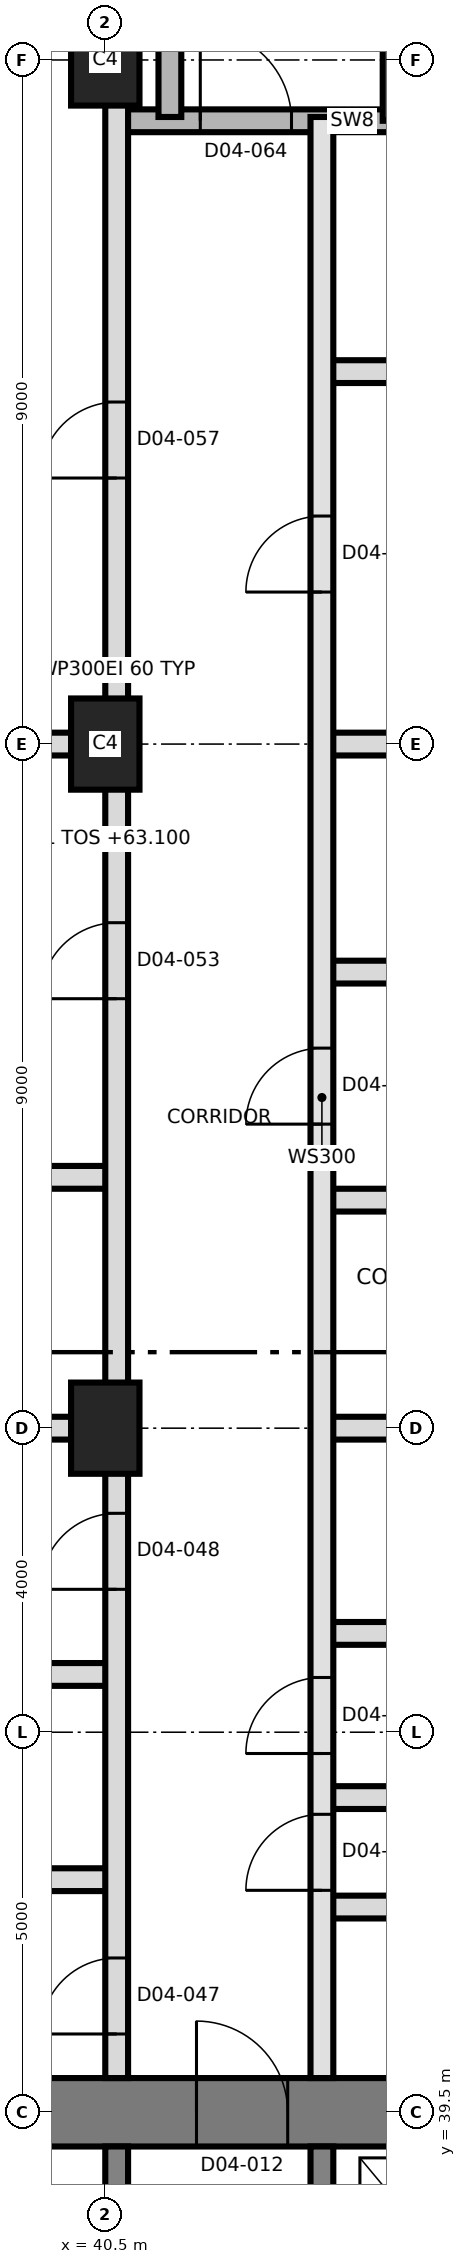
"""IFC4 building model, lengths in metres.
Left out: names, types, materials, properties, quantities, classifications, styles, units other than length and angle.
Written with IfcOpenShell. Run it as: python <this file> out.ifc"""

import sys

from ifc_helpers import new_model, si_unit, direction, frame, frame_2d, origin, origin_2d, place, context, subcontext, project, spatial, rectangle, extrude, element, fill, save


model = new_model("IFC4")
c1 = context("Model", 3, precision=1e-05, world=origin(), true_north=direction((0.0, 1.0)))
c2 = subcontext(c1, "Body", "Model", "MODEL_VIEW")
j1 = project(units=[si_unit("LENGTHUNIT", "METRE"), si_unit("PLANEANGLEUNIT", "RADIAN")], contexts=[c1])
p1 = place(None, origin())
s1 = spatial("IfcSite", under=j1, at=p1, CompositionType="ELEMENT")
p2 = place(p1, origin())
s2 = spatial("IfcBuilding", under=s1, at=p2, CompositionType="ELEMENT")
p3 = place(p2, frame((0.0, 0.0, 63.1)))
s3 = spatial("IfcBuildingStorey", under=s2, at=p3, CompositionType="ELEMENT", Elevation=63.1)
p4 = place(p3, frame((31.05, 39.5, 0.0), z_axis=(0.0, 0.0, 1.0), x_axis=(1.0, 0.0, 0.0)))
e1 = element("IfcWall", 1, at=p4, inside=s3, PredefinedType="SHEAR", context=c2, shape_type="SweptSolid", body=[
    extrude(rectangle(XDim=27.0, YDim=0.9, at=frame_2d((13.5, 0.0))), origin(), (0.0, 0.0, 1.0), 3.7),
])
p5 = place(p4, frame((10.65, 0.0, 0.0)))
e2 = element("IfcOpeningElement", 2, at=p5, cuts=e1, PredefinedType="OPENING", context=c2, shape_type="SweptSolid", body=[
    extrude(rectangle(XDim=1.2, YDim=2.1, at=frame_2d((0.6, 1.05))), frame((0.0, 0.46, 0.0), z_axis=(0.0, -1.0, 0.0), x_axis=(1.0, 0.0, 0.0)), (0.0, 0.0, 1.0), 0.92),
])
for number, where, z_axis, x_axis in (
    (3, (40.65, 33.5, 0.0), (0.0, 0.0, 1.0), (0.0, 1.0, 0.0)),
    (4, (43.35, 33.5, 0.0), (0.0, 0.0, 1.0), (0.0, 1.0, 0.0)),
):
    element("IfcWall", number, at=place(p3, frame(where, z_axis=z_axis, x_axis=x_axis)), inside=s3, PredefinedType="SHEAR", context=c2, shape_type="SweptSolid", body=[
        extrude(rectangle(XDim=5.55, YDim=0.3, at=frame_2d((2.775, 0.0))), origin(), (0.0, 0.0, 1.0), 3.7),
    ])
for number, where, z_axis, x_axis in (
    (5, (40.5, 48.5, 0.0), (0.0, 0.0, 1.0), (0.0, 1.0, 0.0)),
    (6, (40.5, 57.5, 0.0), (0.0, 0.0, 1.0), (0.0, 1.0, 0.0)),
    (7, (40.5, 66.5, 0.0), (0.0, 0.0, 1.0), (0.0, 1.0, 0.0)),
):
    element("IfcColumn", number, at=place(p3, frame(where, z_axis=z_axis, x_axis=x_axis)), inside=s3, PredefinedType="COLUMN", context=c2, shape_type="SweptSolid", body=[
        extrude(rectangle(XDim=1.2, YDim=0.9, at=origin_2d()), origin(), (0.0, 0.0, 1.0), 3.7),
    ])
for number, where, z_axis, x_axis in (
    (8, (43.35, 42.2, 0.0), (0.0, 0.0, 1.0), (1.0, 0.0, 0.0)),
    (9, (37.45, 42.56, 0.0), (0.0, 0.0, 1.0), (1.0, 0.0, 0.0)),
):
    element("IfcWall", number, at=place(p3, frame(where, z_axis=z_axis, x_axis=x_axis)), inside=s3, PredefinedType="PARTITIONING", context=c2, shape_type="SweptSolid", body=[
        extrude(rectangle(XDim=3.2, YDim=0.3, at=frame_2d((1.6, 0.0))), origin(), (0.0, 0.0, 1.0), 3.4),
    ])
p6 = place(p3, frame((43.35, 43.64, 0.0), z_axis=(0.0, 0.0, 1.0), x_axis=(1.0, 0.0, 0.0)))
e10 = element("IfcWall", 10, at=p6, inside=s3, PredefinedType="PARTITIONING", context=c2, shape_type="SweptSolid", body=[
    extrude(rectangle(XDim=9.323, YDim=0.3, at=frame_2d((4.662, 0.0))), origin(), (0.0, 0.0, 1.0), 3.4),
])
p7 = place(p3, frame((29.17, 45.26, 0.0), z_axis=(0.0, 0.0, 1.0), x_axis=(1.0, 0.0, 0.0)))
e11 = element("IfcWall", 11, at=p7, inside=s3, PredefinedType="PARTITIONING", context=c2, shape_type="SweptSolid", body=[
    extrude(rectangle(XDim=11.48, YDim=0.3, at=frame_2d((5.74, 0.0))), origin(), (0.0, 0.0, 1.0), 3.4),
])
p8 = place(p3, frame((43.35, 45.8, 0.0), z_axis=(0.0, 0.0, 1.0), x_axis=(1.0, 0.0, 0.0)))
e12 = element("IfcWall", 12, at=p8, inside=s3, PredefinedType="PARTITIONING", context=c2, shape_type="SweptSolid", body=[
    extrude(rectangle(XDim=3.2, YDim=0.3, at=frame_2d((1.6, 0.0))), origin(), (0.0, 0.0, 1.0), 3.4),
])
p9 = place(p3, frame((29.17, 48.5, 0.0), z_axis=(0.0, 0.0, 1.0), x_axis=(1.0, 0.0, 0.0)))
e13 = element("IfcWall", 13, at=p9, inside=s3, PredefinedType="PARTITIONING", context=c2, shape_type="SweptSolid", body=[
    extrude(rectangle(XDim=11.48, YDim=0.3, at=frame_2d((5.74, 0.0))), origin(), (0.0, 0.0, 1.0), 3.4),
])
p10 = place(p3, frame((43.35, 48.5, 0.0), z_axis=(0.0, 0.0, 1.0), x_axis=(1.0, 0.0, 0.0)))
e14 = element("IfcWall", 14, at=p10, inside=s3, PredefinedType="PARTITIONING", context=c2, shape_type="SweptSolid", body=[
    extrude(rectangle(XDim=8.66, YDim=0.3, at=frame_2d((4.33, 0.0))), origin(), (0.0, 0.0, 1.0), 3.4),
])
p11 = place(p3, frame((43.35, 51.5, 0.0), z_axis=(0.0, 0.0, 1.0), x_axis=(1.0, 0.0, 0.0)))
e15 = element("IfcWall", 15, at=p11, inside=s3, PredefinedType="PARTITIONING", context=c2, shape_type="SweptSolid", body=[
    extrude(rectangle(XDim=3.3, YDim=0.3, at=frame_2d((1.65, 0.0))), origin(), (0.0, 0.0, 1.0), 3.4),
])
p12 = place(p3, frame((37.15, 51.8, 0.0), z_axis=(0.0, 0.0, 1.0), x_axis=(1.0, 0.0, 0.0)))
e16 = element("IfcWall", 16, at=p12, inside=s3, PredefinedType="PARTITIONING", context=c2, shape_type="SweptSolid", body=[
    extrude(rectangle(XDim=3.5, YDim=0.3, at=frame_2d((1.75, 0.0))), origin(), (0.0, 0.0, 1.0), 3.4),
])
p13 = place(p3, frame((43.35, 54.5, 0.0), z_axis=(0.0, 0.0, 1.0), x_axis=(1.0, 0.0, 0.0)))
e17 = element("IfcWall", 17, at=p13, inside=s3, PredefinedType="PARTITIONING", context=c2, shape_type="SweptSolid", body=[
    extrude(rectangle(XDim=3.3, YDim=0.3, at=frame_2d((1.65, 0.0))), origin(), (0.0, 0.0, 1.0), 3.4),
])
p14 = place(p3, frame((29.17, 57.5, 0.0), z_axis=(0.0, 0.0, 1.0), x_axis=(1.0, 0.0, 0.0)))
e18 = element("IfcWall", 18, at=p14, inside=s3, PredefinedType="PARTITIONING", context=c2, shape_type="SweptSolid", body=[
    extrude(rectangle(XDim=11.48, YDim=0.3, at=frame_2d((5.74, 0.0))), origin(), (0.0, 0.0, 1.0), 3.4),
])
p15 = place(p3, frame((43.35, 57.5, 0.0), z_axis=(0.0, 0.0, 1.0), x_axis=(1.0, 0.0, 0.0)))
e19 = element("IfcWall", 19, at=p15, inside=s3, PredefinedType="PARTITIONING", context=c2, shape_type="SweptSolid", body=[
    extrude(rectangle(XDim=8.66, YDim=0.3, at=frame_2d((4.33, 0.0))), origin(), (0.0, 0.0, 1.0), 3.4),
])
p16 = place(p3, frame((43.35, 62.4, 0.0), z_axis=(0.0, 0.0, 1.0), x_axis=(1.0, 0.0, 0.0)))
e20 = element("IfcWall", 20, at=p16, inside=s3, PredefinedType="PARTITIONING", context=c2, shape_type="SweptSolid", body=[
    extrude(rectangle(XDim=8.66, YDim=0.3, at=frame_2d((4.33, 0.0))), origin(), (0.0, 0.0, 1.0), 3.4),
])
p17 = place(p16, frame((4.65, 0.0, 0.0)))
e21 = element("IfcOpeningElement", 21, at=p17, cuts=e20, PredefinedType="OPENING", context=c2, shape_type="SweptSolid", body=[
    extrude(rectangle(XDim=1.0, YDim=2.1, at=frame_2d((0.5, 1.05))), frame((0.0, 0.16, 0.0), z_axis=(0.0, -1.0, 0.0), x_axis=(1.0, 0.0, 0.0)), (0.0, 0.0, 1.0), 0.32),
])
p18 = place(p3, frame((40.65, 65.7, 0.0), z_axis=(0.0, 0.0, 1.0), x_axis=(1.0, 0.0, 0.0)))
e22 = element("IfcWall", 22, at=p18, inside=s3, PredefinedType="SHEAR", context=c2, shape_type="SweptSolid", body=[
    extrude(rectangle(XDim=6.2, YDim=0.3, at=frame_2d((3.1, 0.0))), origin(), (0.0, 0.0, 1.0), 3.4),
])
p19 = place(p18, frame((1.1, 0.0, 0.0)))
e23 = element("IfcOpeningElement", 23, at=p19, cuts=e22, PredefinedType="OPENING", context=c2, shape_type="SweptSolid", body=[
    extrude(rectangle(XDim=1.2, YDim=2.1, at=frame_2d((0.6, 1.05))), frame((0.0, 0.16, 0.0), z_axis=(0.0, -1.0, 0.0), x_axis=(1.0, 0.0, 0.0)), (0.0, 0.0, 1.0), 0.32),
])
p20 = place(p3, frame((40.65, 39.95, 0.0), z_axis=(0.0, 0.0, 1.0), x_axis=(0.0, 1.0, 0.0)))
e24 = element("IfcWall", 24, at=p20, inside=s3, PredefinedType="PARTITIONING", context=c2, shape_type="SweptSolid", body=[
    extrude(rectangle(XDim=37.05, YDim=0.3, at=frame_2d((18.525, 0.0))), origin(), (0.0, 0.0, 1.0), 3.4),
])
p21 = place(p20, frame((0.58, 0.0, 0.0)))
e25 = element("IfcOpeningElement", 25, at=p21, cuts=e24, PredefinedType="OPENING", context=c2, shape_type="SweptSolid", body=[
    extrude(rectangle(XDim=1.0, YDim=2.1, at=frame_2d((0.5, 1.05))), frame((0.0, 0.16, 0.0), z_axis=(0.0, -1.0, 0.0), x_axis=(1.0, 0.0, 0.0)), (0.0, 0.0, 1.0), 0.32),
])
p22 = place(p20, frame((6.43, 0.0, 0.0)))
e26 = element("IfcOpeningElement", 26, at=p22, cuts=e24, PredefinedType="OPENING", context=c2, shape_type="SweptSolid", body=[
    extrude(rectangle(XDim=1.0, YDim=2.1, at=frame_2d((0.5, 1.05))), frame((0.0, 0.16, 0.0), z_axis=(0.0, -1.0, 0.0), x_axis=(1.0, 0.0, 0.0)), (0.0, 0.0, 1.0), 0.32),
])
p23 = place(p20, frame((14.2, 0.0, 0.0)))
e27 = element("IfcOpeningElement", 27, at=p23, cuts=e24, PredefinedType="OPENING", context=c2, shape_type="SweptSolid", body=[
    extrude(rectangle(XDim=1.0, YDim=2.4, at=frame_2d((0.5, 1.2))), frame((0.0, 0.16, 0.0), z_axis=(0.0, -1.0, 0.0), x_axis=(1.0, 0.0, 0.0)), (0.0, 0.0, 1.0), 0.32),
])
p24 = place(p20, frame((21.05, 0.0, 0.0)))
e28 = element("IfcOpeningElement", 28, at=p24, cuts=e24, PredefinedType="OPENING", context=c2, shape_type="SweptSolid", body=[
    extrude(rectangle(XDim=1.0, YDim=2.4, at=frame_2d((0.5, 1.2))), frame((0.0, 0.16, 0.0), z_axis=(0.0, -1.0, 0.0), x_axis=(1.0, 0.0, 0.0)), (0.0, 0.0, 1.0), 0.32),
])
p25 = place(p3, frame((41.35, 65.75, 0.0), z_axis=(0.0, 0.0, 1.0), x_axis=(0.0, 1.0, 0.0)))
e29 = element("IfcWall", 29, at=p25, inside=s3, PredefinedType="SHEAR", context=c2, shape_type="SweptSolid", body=[
    extrude(rectangle(XDim=8.85, YDim=0.3, at=frame_2d((4.425, 0.0))), origin(), (0.0, 0.0, 1.0), 3.4),
])
p26 = place(p3, frame((43.35, 39.95, 0.0), z_axis=(0.0, 0.0, 1.0), x_axis=(0.0, 1.0, 0.0)))
e30 = element("IfcWall", 30, at=p26, inside=s3, PredefinedType="SOLIDWALL", context=c2, shape_type="SweptSolid", body=[
    extrude(rectangle(XDim=25.8, YDim=0.3, at=frame_2d((12.9, 0.0))), origin(), (0.0, 0.0, 1.0), 3.4),
])
p27 = place(p26, frame((2.47, 0.0, 0.0)))
e31 = element("IfcOpeningElement", 31, at=p27, cuts=e30, PredefinedType="OPENING", context=c2, shape_type="SweptSolid", body=[
    extrude(rectangle(XDim=1.0, YDim=2.1, at=frame_2d((0.5, 1.05))), frame((0.0, 0.16, 0.0), z_axis=(0.0, -1.0, 0.0), x_axis=(1.0, 0.0, 0.0)), (0.0, 0.0, 1.0), 0.32),
])
p28 = place(p26, frame((4.27, 0.0, 0.0)))
e32 = element("IfcOpeningElement", 32, at=p28, cuts=e30, PredefinedType="OPENING", context=c2, shape_type="SweptSolid", body=[
    extrude(rectangle(XDim=1.0, YDim=2.1, at=frame_2d((0.5, 1.05))), frame((0.0, 0.16, 0.0), z_axis=(0.0, -1.0, 0.0), x_axis=(1.0, 0.0, 0.0)), (0.0, 0.0, 1.0), 0.32),
])
p29 = place(p26, frame((12.55, 0.0, 0.0)))
e33 = element("IfcOpeningElement", 33, at=p29, cuts=e30, PredefinedType="OPENING", context=c2, shape_type="SweptSolid", body=[
    extrude(rectangle(XDim=1.0, YDim=2.4, at=frame_2d((0.5, 1.2))), frame((0.0, 0.16, 0.0), z_axis=(0.0, -1.0, 0.0), x_axis=(1.0, 0.0, 0.0)), (0.0, 0.0, 1.0), 0.32),
])
p30 = place(p26, frame((19.55, 0.0, 0.0)))
e34 = element("IfcOpeningElement", 34, at=p30, cuts=e30, PredefinedType="OPENING", context=c2, shape_type="SweptSolid", body=[
    extrude(rectangle(XDim=1.0, YDim=2.4, at=frame_2d((0.5, 1.2))), frame((0.0, 0.16, 0.0), z_axis=(0.0, -1.0, 0.0), x_axis=(1.0, 0.0, 0.0)), (0.0, 0.0, 1.0), 0.32),
])
p31 = place(p3, frame((44.3, 65.7, 0.0), z_axis=(0.0, 0.0, 1.0), x_axis=(0.0, 1.0, 0.0)))
e35 = element("IfcWall", 35, at=p31, inside=s3, PredefinedType="SHEAR", context=c2, shape_type="SweptSolid", body=[
    extrude(rectangle(XDim=8.9, YDim=0.3, at=frame_2d((4.45, 0.0))), origin(), (0.0, 0.0, 1.0), 3.4),
])
p32 = place(p5, origin())
e36 = element("IfcDoor", 36, at=p32, inside=s3, OperationType="SINGLE_SWING_RIGHT", PredefinedType="DOOR", context=c2, shape_type="SweptSolid", body=[
    extrude(rectangle(XDim=1.2, YDim=2.1, at=frame_2d((0.6, 1.05))), frame((0.0, 0.025, 0.0), z_axis=(0.0, -1.0, 0.0), x_axis=(1.0, 0.0, 0.0)), (0.0, 0.0, 1.0), 0.05),
])
fill(e2, e36)
p33 = place(p27, origin())
e37 = element("IfcDoor", 37, at=p33, inside=s3, OperationType="SINGLE_SWING_LEFT", PredefinedType="DOOR", context=c2, shape_type="SweptSolid", body=[
    extrude(rectangle(XDim=1.0, YDim=2.1, at=frame_2d((0.5, 1.05))), frame((0.0, 0.025, 0.0), z_axis=(0.0, -1.0, 0.0), x_axis=(1.0, 0.0, 0.0)), (0.0, 0.0, 1.0), 0.05),
])
fill(e31, e37)
p34 = place(p28, origin())
e38 = element("IfcDoor", 38, at=p34, inside=s3, OperationType="SINGLE_SWING_LEFT", PredefinedType="DOOR", context=c2, shape_type="SweptSolid", body=[
    extrude(rectangle(XDim=1.0, YDim=2.1, at=frame_2d((0.5, 1.05))), frame((0.0, 0.025, 0.0), z_axis=(0.0, -1.0, 0.0), x_axis=(1.0, 0.0, 0.0)), (0.0, 0.0, 1.0), 0.05),
])
fill(e32, e38)
p35 = place(p21, origin())
e39 = element("IfcDoor", 39, at=p35, inside=s3, OperationType="SINGLE_SWING_RIGHT", PredefinedType="DOOR", context=c2, shape_type="SweptSolid", body=[
    extrude(rectangle(XDim=1.0, YDim=2.1, at=frame_2d((0.5, 1.05))), frame((0.0, 0.025, 0.0), z_axis=(0.0, -1.0, 0.0), x_axis=(1.0, 0.0, 0.0)), (0.0, 0.0, 1.0), 0.05),
])
fill(e25, e39)
p36 = place(p22, origin())
e40 = element("IfcDoor", 40, at=p36, inside=s3, OperationType="SINGLE_SWING_LEFT", PredefinedType="DOOR", context=c2, shape_type="SweptSolid", body=[
    extrude(rectangle(XDim=1.0, YDim=2.1, at=frame_2d((0.5, 1.05))), frame((0.0, 0.025, 0.0), z_axis=(0.0, -1.0, 0.0), x_axis=(1.0, 0.0, 0.0)), (0.0, 0.0, 1.0), 0.05),
])
fill(e26, e40)
p37 = place(p29, origin())
e41 = element("IfcDoor", 41, at=p37, inside=s3, OperationType="SINGLE_SWING_RIGHT", PredefinedType="DOOR", context=c2, shape_type="SweptSolid", body=[
    extrude(rectangle(XDim=1.0, YDim=2.4, at=frame_2d((0.5, 1.2))), frame((0.0, 0.025, 0.0), z_axis=(0.0, -1.0, 0.0), x_axis=(1.0, 0.0, 0.0)), (0.0, 0.0, 1.0), 0.05),
])
fill(e33, e41)
p38 = place(p23, origin())
e42 = element("IfcDoor", 42, at=p38, inside=s3, OperationType="SINGLE_SWING_RIGHT", PredefinedType="DOOR", context=c2, shape_type="SweptSolid", body=[
    extrude(rectangle(XDim=1.0, YDim=2.4, at=frame_2d((0.5, 1.2))), frame((0.0, 0.025, 0.0), z_axis=(0.0, -1.0, 0.0), x_axis=(1.0, 0.0, 0.0)), (0.0, 0.0, 1.0), 0.05),
])
fill(e27, e42)
p39 = place(p30, origin())
e43 = element("IfcDoor", 43, at=p39, inside=s3, OperationType="SINGLE_SWING_LEFT", PredefinedType="DOOR", context=c2, shape_type="SweptSolid", body=[
    extrude(rectangle(XDim=1.0, YDim=2.4, at=frame_2d((0.5, 1.2))), frame((0.0, 0.025, 0.0), z_axis=(0.0, -1.0, 0.0), x_axis=(1.0, 0.0, 0.0)), (0.0, 0.0, 1.0), 0.05),
])
fill(e34, e43)
p40 = place(p24, origin())
e44 = element("IfcDoor", 44, at=p40, inside=s3, OperationType="SINGLE_SWING_LEFT", PredefinedType="DOOR", context=c2, shape_type="SweptSolid", body=[
    extrude(rectangle(XDim=1.0, YDim=2.4, at=frame_2d((0.5, 1.2))), frame((0.0, 0.025, 0.0), z_axis=(0.0, -1.0, 0.0), x_axis=(1.0, 0.0, 0.0)), (0.0, 0.0, 1.0), 0.05),
])
fill(e28, e44)
p41 = place(p19, origin())
e45 = element("IfcDoor", 45, at=p41, inside=s3, OperationType="SINGLE_SWING_RIGHT", PredefinedType="DOOR", context=c2, shape_type="SweptSolid", body=[
    extrude(rectangle(XDim=1.2, YDim=2.1, at=frame_2d((0.6, 1.05))), frame((0.0, 0.025, 0.0), z_axis=(0.0, -1.0, 0.0), x_axis=(1.0, 0.0, 0.0)), (0.0, 0.0, 1.0), 0.05),
])
fill(e23, e45)
save(model, sys.argv[1])
